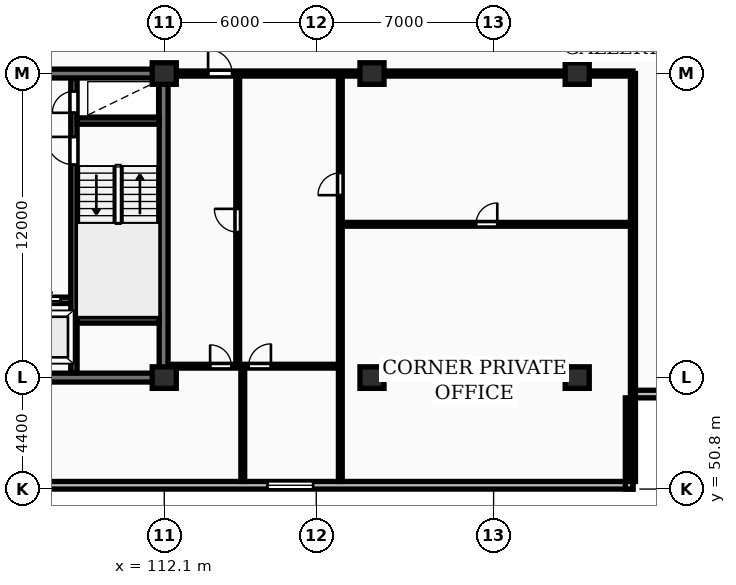
"""IFC4 building model, lengths in metres.
Left out: names, types, materials, properties, quantities, classifications, styles, units other than length and angle.
Written with IfcOpenShell. Run it as: python <this file> out.ifc"""

import sys

from ifc_helpers import new_model, si_unit, direction, frame, frame_2d, origin, origin_2d, place, context, subcontext, project, spatial, rectangle, extrude, element, fill, save


model = new_model("IFC4")
c1 = context("Model", 3, precision=1e-05, world=origin(), true_north=direction((0.0, 1.0)))
c2 = subcontext(c1, "Body", "Model", "MODEL_VIEW")
j1 = project(units=[si_unit("LENGTHUNIT", "METRE"), si_unit("PLANEANGLEUNIT", "RADIAN")], contexts=[c1])
p1 = place(None, origin())
s1 = spatial("IfcSite", under=j1, at=p1, CompositionType="ELEMENT")
p2 = place(p1, origin())
s2 = spatial("IfcBuilding", under=s1, at=p2, CompositionType="ELEMENT")
p3 = place(p2, frame((0.0, 0.0, 93.8)))
s3 = spatial("IfcBuildingStorey", under=s2, at=p3, CompositionType="ELEMENT", Elevation=93.8)
for number, where, z_axis, x_axis in (
    (1, (112.1, 55.2, 0.0), (0.0, 0.0, 1.0), (1.0, 0.0, 0.0)),
    (2, (112.1, 67.2, 0.0), (0.0, 0.0, 1.0), (1.0, 0.0, 0.0)),
    (3, (120.3, 55.2, 0.0), (0.0, 0.0, 1.0), (1.0, 0.0, 0.0)),
    (4, (120.3, 67.2, 0.0), (0.0, 0.0, 1.0), (1.0, 0.0, 0.0)),
    (5, (128.4, 55.2, 0.0), (0.0, 0.0, 1.0), (1.0, 0.0, 0.0)),
    (6, (128.4, 67.2, 0.0), (0.0, 0.0, 1.0), (1.0, 0.0, 0.0)),
):
    element("IfcColumn", number, at=place(p3, frame(where, z_axis=z_axis, x_axis=x_axis)), inside=s3, PredefinedType="COLUMN", context=c2, shape_type="SweptSolid", body=[
        extrude(rectangle(XDim=0.95, YDim=0.85, at=origin_2d()), origin(), (0.0, 0.0, 1.0), 3.25),
    ])
p4 = place(p3, frame((57.6, 50.95, 0.0), z_axis=(0.0, 0.0, 1.0), x_axis=(1.0, 0.0, 0.0)))
e7 = element("IfcWall", 7, at=p4, inside=s3, PredefinedType="STANDARD", context=c2, shape_type="SweptSolid", body=[
    extrude(rectangle(XDim=73.0, YDim=0.3, at=frame_2d((36.5, 0.0))), origin(), (0.0, 0.0, 1.0), 2.97),
])
p5 = place(p4, frame((15.225, 0.0, 0.85)))
e8 = element("IfcOpeningElement", 8, at=p5, cuts=e7, PredefinedType="OPENING", context=c2, shape_type="SweptSolid", body=[
    extrude(rectangle(XDim=1.8, YDim=1.8, at=frame_2d((0.9, 0.9))), frame((0.0, 0.16, 0.0), z_axis=(0.0, -1.0, 0.0), x_axis=(1.0, 0.0, 0.0)), (0.0, 0.0, 1.0), 0.32),
])
p6 = place(p4, frame((58.575, 0.0, 0.85)))
e9 = element("IfcOpeningElement", 9, at=p6, cuts=e7, PredefinedType="OPENING", context=c2, shape_type="SweptSolid", body=[
    extrude(rectangle(XDim=1.8, YDim=1.8, at=frame_2d((0.9, 0.9))), frame((0.0, 0.16, 0.0), z_axis=(0.0, -1.0, 0.0), x_axis=(1.0, 0.0, 0.0)), (0.0, 0.0, 1.0), 0.32),
])
for number, where, z_axis, x_axis in (
    (10, (130.45, 50.8, 0.0), (0.0, 0.0, 1.0), (0.0, 1.0, 0.0)),
    (11, (130.6, 54.55, 0.0), (0.0, 0.0, 1.0), (1.0, 0.0, 0.0)),
):
    element("IfcWall", number, at=place(p3, frame(where, z_axis=z_axis, x_axis=x_axis)), inside=s3, PredefinedType="STANDARD", context=c2, shape_type="SweptSolid", body=[
        extrude(rectangle(XDim=3.6, YDim=0.3, at=frame_2d((1.8, 0.0))), origin(), (0.0, 0.0, 1.0), 2.97),
    ])
p7 = place(p3, frame((75.95, 55.2, 0.0), z_axis=(0.0, 0.0, 1.0), x_axis=(1.0, 0.0, 0.0)))
e12 = element("IfcWall", 12, at=p7, inside=s3, PredefinedType="SHEAR", context=c2, shape_type="SweptSolid", body=[
    extrude(rectangle(XDim=36.3, YDim=0.35, at=frame_2d((18.15, 0.0))), origin(), (0.0, 0.0, 1.0), 3.25),
])
p8 = place(p3, frame((112.075, 55.375, 0.0), z_axis=(0.0, 0.0, 1.0), x_axis=(0.0, 1.0, 0.0)))
e13 = element("IfcWall", 13, at=p8, inside=s3, PredefinedType="SHEAR", context=c2, shape_type="SweptSolid", body=[
    extrude(rectangle(XDim=11.65, YDim=0.35, at=frame_2d((5.825, 0.0))), origin(), (0.0, 0.0, 1.0), 3.25),
])
p9 = place(p3, frame((75.95, 67.2, 0.0), z_axis=(0.0, 0.0, 1.0), x_axis=(1.0, 0.0, 0.0)))
e14 = element("IfcWall", 14, at=p9, inside=s3, PredefinedType="SHEAR", context=c2, shape_type="SweptSolid", body=[
    extrude(rectangle(XDim=36.3, YDim=0.35, at=frame_2d((18.15, 0.0))), origin(), (0.0, 0.0, 1.0), 3.25),
])
p10 = place(p9, frame((5.25, 0.0, 0.0)))
e15 = element("IfcOpeningElement", 15, at=p10, cuts=e14, PredefinedType="OPENING", context=c2, shape_type="SweptSolid", body=[
    extrude(rectangle(XDim=1.0, YDim=2.15, at=frame_2d((0.5, 1.075))), frame((0.0, 0.185, 0.0), z_axis=(0.0, -1.0, 0.0), x_axis=(1.0, 0.0, 0.0)), (0.0, 0.0, 1.0), 0.37),
])
p11 = place(p9, frame((21.6, 0.0, 0.0)))
e16 = element("IfcOpeningElement", 16, at=p11, cuts=e14, PredefinedType="OPENING", context=c2, shape_type="SweptSolid", body=[
    extrude(rectangle(XDim=1.5, YDim=2.2, at=frame_2d((0.75, 1.1))), frame((0.0, 0.185, 0.0), z_axis=(0.0, -1.0, 0.0), x_axis=(1.0, 0.0, 0.0)), (0.0, 0.0, 1.0), 0.37),
])
p12 = place(p9, frame((30.45, 0.0, 0.0)))
e17 = element("IfcOpeningElement", 17, at=p12, cuts=e14, PredefinedType="OPENING", context=c2, shape_type="SweptSolid", body=[
    extrude(rectangle(XDim=1.0, YDim=2.15, at=frame_2d((0.5, 1.075))), frame((0.0, 0.185, 0.0), z_axis=(0.0, -1.0, 0.0), x_axis=(1.0, 0.0, 0.0)), (0.0, 0.0, 1.0), 0.37),
])
p13 = place(p3, frame((106.22, 58.25, 0.0), z_axis=(0.0, 0.0, 1.0), x_axis=(1.0, 0.0, 0.0)))
e18 = element("IfcWall", 18, at=p13, inside=s3, PredefinedType="SHEAR", context=c2, shape_type="SweptSolid", body=[
    extrude(rectangle(XDim=2.46, YDim=0.25, at=frame_2d((1.23, 0.0))), origin(), (0.0, 0.0, 1.0), 3.25),
])
p14 = place(p13, frame((0.67, 0.0, 0.0)))
e19 = element("IfcOpeningElement", 19, at=p14, cuts=e18, PredefinedType="OPENING", context=c2, shape_type="SweptSolid", body=[
    extrude(rectangle(XDim=1.12, YDim=2.12, at=frame_2d((0.56, 1.06))), frame((0.0, 0.135, 0.0), z_axis=(0.0, -1.0, 0.0), x_axis=(1.0, 0.0, 0.0)), (0.0, 0.0, 1.0), 0.27),
])
p15 = place(p3, frame((108.535, 55.4, 0.0), z_axis=(0.0, 0.0, 1.0), x_axis=(0.0, 1.0, 0.0)))
e20 = element("IfcWall", 20, at=p15, inside=s3, PredefinedType="SHEAR", context=c2, shape_type="SweptSolid", body=[
    extrude(rectangle(XDim=11.6, YDim=0.25, at=frame_2d((5.8, 0.0))), origin(), (0.0, 0.0, 1.0), 3.25),
])
p16 = place(p15, frame((8.2, 0.0, 0.0)))
e21 = element("IfcOpeningElement", 21, at=p16, cuts=e20, PredefinedType="OPENING", context=c2, shape_type="SweptSolid", body=[
    extrude(rectangle(XDim=1.1, YDim=2.1, at=frame_2d((0.55, 1.05))), frame((0.0, 0.135, 0.0), z_axis=(0.0, -1.0, 0.0), x_axis=(1.0, 0.0, 0.0)), (0.0, 0.0, 1.0), 0.27),
])
p17 = place(p15, frame((10.25, 0.0, 0.0)))
e22 = element("IfcOpeningElement", 22, at=p17, cuts=e20, PredefinedType="OPENING", context=c2, shape_type="SweptSolid", body=[
    extrude(rectangle(XDim=0.85, YDim=2.05, at=frame_2d((0.425, 1.025))), frame((0.0, 0.135, 0.0), z_axis=(0.0, -1.0, 0.0), x_axis=(1.0, 0.0, 0.0)), (0.0, 0.0, 1.0), 0.27),
])
for number, where, z_axis, x_axis in (
    (23, (108.66, 57.475, 0.0), (0.0, 0.0, 1.0), (1.0, 0.0, 0.0)),
    (24, (108.66, 65.325, 0.0), (0.0, 0.0, 1.0), (1.0, 0.0, 0.0)),
):
    element("IfcWall", number, at=place(p3, frame(where, z_axis=z_axis, x_axis=x_axis)), inside=s3, PredefinedType="SHEAR", context=c2, shape_type="SweptSolid", body=[
        extrude(rectangle(XDim=3.24, YDim=0.25, at=frame_2d((1.62, 0.0))), origin(), (0.0, 0.0, 1.0), 3.25),
    ])
p18 = place(p3, frame((130.6, 51.1, 0.0), z_axis=(0.0, 0.0, 1.0), x_axis=(0.0, 1.0, 0.0)))
e25 = element("IfcWall", 25, at=p18, inside=s3, PredefinedType="PARTITIONING", context=c2, shape_type="SweptSolid", body=[
    extrude(rectangle(XDim=16.1, YDim=0.2, at=frame_2d((8.05, 0.0))), origin(), (0.0, 0.0, 1.0), 2.97),
])
p19 = place(p3, frame((119.05, 61.25, 0.0), z_axis=(0.0, 0.0, 1.0), x_axis=(1.0, 0.0, 0.0)))
e26 = element("IfcWall", 26, at=p19, inside=s3, PredefinedType="PARTITIONING", context=c2, shape_type="SweptSolid", body=[
    extrude(rectangle(XDim=11.55, YDim=0.15, at=frame_2d((5.775, 0.0))), origin(), (0.0, 0.0, 1.0), 2.97),
])
p20 = place(p19, frame((5.355, 0.0, 0.0)))
e27 = element("IfcOpeningElement", 27, at=p20, cuts=e26, PredefinedType="OPENING", context=c2, shape_type="SweptSolid", body=[
    extrude(rectangle(XDim=0.84, YDim=2.04, at=frame_2d((0.42, 1.02))), frame((0.0, 0.085, 0.0), z_axis=(0.0, -1.0, 0.0), x_axis=(1.0, 0.0, 0.0)), (0.0, 0.0, 1.0), 0.17),
])
p21 = place(p3, frame((119.05, 51.1, 0.0), z_axis=(0.0, 0.0, 1.0), x_axis=(0.0, 1.0, 0.0)))
e28 = element("IfcWall", 28, at=p21, inside=s3, PredefinedType="PARTITIONING", context=c2, shape_type="SweptSolid", body=[
    extrude(rectangle(XDim=16.05, YDim=0.15, at=frame_2d((8.025, 0.0))), origin(), (0.0, 0.0, 1.0), 2.97),
])
p22 = place(p21, frame((11.3, 0.0, 0.0)))
e29 = element("IfcOpeningElement", 29, at=p22, cuts=e28, PredefinedType="OPENING", context=c2, shape_type="SweptSolid", body=[
    extrude(rectangle(XDim=0.88, YDim=2.06, at=frame_2d((0.44, 1.03))), frame((0.0, 0.085, 0.0), z_axis=(0.0, -1.0, 0.0), x_axis=(1.0, 0.0, 0.0)), (0.0, 0.0, 1.0), 0.17),
])
p23 = place(p3, frame((115.0, 55.65, 0.0), z_axis=(0.0, 0.0, 1.0), x_axis=(0.0, 1.0, 0.0)))
e30 = element("IfcWall", 30, at=p23, inside=s3, PredefinedType="PARTITIONING", context=c2, shape_type="SweptSolid", body=[
    extrude(rectangle(XDim=11.5, YDim=0.15, at=frame_2d((5.75, 0.0))), origin(), (0.0, 0.0, 1.0), 2.97),
])
p24 = place(p23, frame((5.29, 0.0, 0.0)))
e31 = element("IfcOpeningElement", 31, at=p24, cuts=e30, PredefinedType="OPENING", context=c2, shape_type="SweptSolid", body=[
    extrude(rectangle(XDim=0.92, YDim=2.08, at=frame_2d((0.46, 1.04))), frame((0.0, 0.085, 0.0), z_axis=(0.0, -1.0, 0.0), x_axis=(1.0, 0.0, 0.0)), (0.0, 0.0, 1.0), 0.17),
])
p25 = place(p3, frame((115.2, 51.1, 0.0), z_axis=(0.0, 0.0, 1.0), x_axis=(0.0, 1.0, 0.0)))
e32 = element("IfcWall", 32, at=p25, inside=s3, PredefinedType="PARTITIONING", context=c2, shape_type="SweptSolid", body=[
    extrude(rectangle(XDim=4.55, YDim=0.15, at=frame_2d((2.275, 0.0))), origin(), (0.0, 0.0, 1.0), 2.97),
])
p26 = place(p3, frame((112.27, 55.65, 0.0), z_axis=(0.0, 0.0, 1.0), x_axis=(1.0, 0.0, 0.0)))
e33 = element("IfcWall", 33, at=p26, inside=s3, PredefinedType="PARTITIONING", context=c2, shape_type="SweptSolid", body=[
    extrude(rectangle(XDim=6.76, YDim=0.15, at=frame_2d((3.38, 0.0))), origin(), (0.0, 0.0, 1.0), 2.97),
])
p27 = place(p26, frame((1.64, 0.0, 0.0)))
e34 = element("IfcOpeningElement", 34, at=p27, cuts=e33, PredefinedType="OPENING", context=c2, shape_type="SweptSolid", body=[
    extrude(rectangle(XDim=0.84, YDim=2.04, at=frame_2d((0.42, 1.02))), frame((0.0, 0.085, 0.0), z_axis=(0.0, -1.0, 0.0), x_axis=(1.0, 0.0, 0.0)), (0.0, 0.0, 1.0), 0.17),
])
p28 = place(p26, frame((3.16, 0.0, 0.0)))
e35 = element("IfcOpeningElement", 35, at=p28, cuts=e33, PredefinedType="OPENING", context=c2, shape_type="SweptSolid", body=[
    extrude(rectangle(XDim=0.88, YDim=2.06, at=frame_2d((0.44, 1.03))), frame((0.0, 0.085, 0.0), z_axis=(0.0, -1.0, 0.0), x_axis=(1.0, 0.0, 0.0)), (0.0, 0.0, 1.0), 0.17),
])
p29 = place(p3, frame((112.25, 67.2, 0.0), z_axis=(0.0, 0.0, 1.0), x_axis=(1.0, 0.0, 0.0)))
e36 = element("IfcWall", 36, at=p29, inside=s3, PredefinedType="PARTITIONING", context=c2, shape_type="SweptSolid", body=[
    extrude(rectangle(XDim=18.35, YDim=0.2, at=frame_2d((9.175, 0.0))), origin(), (0.0, 0.0, 1.0), 2.433),
])
p30 = place(p29, frame((1.58, 0.0, 0.0)))
e37 = element("IfcOpeningElement", 37, at=p30, cuts=e36, PredefinedType="OPENING", context=c2, shape_type="SweptSolid", body=[
    extrude(rectangle(XDim=0.95, YDim=2.15, at=frame_2d((0.475, 1.075))), frame((0.0, 0.11, 0.0), z_axis=(0.0, -1.0, 0.0), x_axis=(1.0, 0.0, 0.0)), (0.0, 0.0, 1.0), 0.22),
])
p31 = place(p6, origin())
e38 = element("IfcWindow", 38, at=p31, inside=s3, PartitioningType="SINGLE_PANEL", PredefinedType="WINDOW", context=c2, shape_type="SweptSolid", body=[
    extrude(rectangle(XDim=1.8, YDim=1.8, at=frame_2d((0.9, 0.9))), frame((0.0, 0.03, 0.0), z_axis=(0.0, -1.0, 0.0), x_axis=(1.0, 0.0, 0.0)), (0.0, 0.0, 1.0), 0.06),
])
fill(e9, e38)
p32 = place(p14, origin())
e39 = element("IfcDoor", 39, at=p32, inside=s3, OperationType="SLIDING_TO_RIGHT", PredefinedType="DOOR", context=c2, shape_type="SweptSolid", body=[
    extrude(rectangle(XDim=1.12, YDim=2.12, at=frame_2d((0.56, 1.06))), frame((0.0, 0.025, 0.0), z_axis=(0.0, -1.0, 0.0), x_axis=(1.0, 0.0, 0.0)), (0.0, 0.0, 1.0), 0.05),
])
fill(e19, e39)
p33 = place(p16, origin())
e40 = element("IfcDoor", 40, at=p33, inside=s3, OperationType="SINGLE_SWING_RIGHT", PredefinedType="DOOR", context=c2, shape_type="SweptSolid", body=[
    extrude(rectangle(XDim=1.1, YDim=2.1, at=frame_2d((0.55, 1.05))), frame((0.0, 0.025, 0.0), z_axis=(0.0, -1.0, 0.0), x_axis=(1.0, 0.0, 0.0)), (0.0, 0.0, 1.0), 0.05),
])
fill(e21, e40)
p34 = place(p17, origin())
e41 = element("IfcDoor", 41, at=p34, inside=s3, OperationType="SINGLE_SWING_LEFT", PredefinedType="DOOR", context=c2, shape_type="SweptSolid", body=[
    extrude(rectangle(XDim=0.85, YDim=2.05, at=frame_2d((0.425, 1.025))), frame((0.0, 0.025, 0.0), z_axis=(0.0, -1.0, 0.0), x_axis=(1.0, 0.0, 0.0)), (0.0, 0.0, 1.0), 0.05),
])
fill(e22, e41)
p35 = place(p20, origin())
e42 = element("IfcDoor", 42, at=p35, inside=s3, OperationType="SINGLE_SWING_RIGHT", PredefinedType="DOOR", context=c2, shape_type="SweptSolid", body=[
    extrude(rectangle(XDim=0.84, YDim=2.04, at=frame_2d((0.42, 1.02))), frame((0.0, 0.025, 0.0), z_axis=(0.0, -1.0, 0.0), x_axis=(1.0, 0.0, 0.0)), (0.0, 0.0, 1.0), 0.05),
])
fill(e27, e42)
p36 = place(p22, origin())
e43 = element("IfcDoor", 43, at=p36, inside=s3, OperationType="SINGLE_SWING_LEFT", PredefinedType="DOOR", context=c2, shape_type="SweptSolid", body=[
    extrude(rectangle(XDim=0.88, YDim=2.06, at=frame_2d((0.44, 1.03))), frame((0.0, 0.025, 0.0), z_axis=(0.0, -1.0, 0.0), x_axis=(1.0, 0.0, 0.0)), (0.0, 0.0, 1.0), 0.05),
])
fill(e29, e43)
p37 = place(p24, origin())
e44 = element("IfcDoor", 44, at=p37, inside=s3, OperationType="SINGLE_SWING_RIGHT", PredefinedType="DOOR", context=c2, shape_type="SweptSolid", body=[
    extrude(rectangle(XDim=0.92, YDim=2.08, at=frame_2d((0.46, 1.04))), frame((0.0, 0.025, 0.0), z_axis=(0.0, -1.0, 0.0), x_axis=(1.0, 0.0, 0.0)), (0.0, 0.0, 1.0), 0.05),
])
fill(e31, e44)
p38 = place(p27, origin())
e45 = element("IfcDoor", 45, at=p38, inside=s3, OperationType="SINGLE_SWING_LEFT", PredefinedType="DOOR", context=c2, shape_type="SweptSolid", body=[
    extrude(rectangle(XDim=0.84, YDim=2.04, at=frame_2d((0.42, 1.02))), frame((0.0, 0.025, 0.0), z_axis=(0.0, -1.0, 0.0), x_axis=(1.0, 0.0, 0.0)), (0.0, 0.0, 1.0), 0.05),
])
fill(e34, e45)
p39 = place(p28, origin())
e46 = element("IfcDoor", 46, at=p39, inside=s3, OperationType="SINGLE_SWING_RIGHT", PredefinedType="DOOR", context=c2, shape_type="SweptSolid", body=[
    extrude(rectangle(XDim=0.88, YDim=2.06, at=frame_2d((0.44, 1.03))), frame((0.0, 0.025, 0.0), z_axis=(0.0, -1.0, 0.0), x_axis=(1.0, 0.0, 0.0)), (0.0, 0.0, 1.0), 0.05),
])
fill(e35, e46)
p40 = place(p30, origin())
e47 = element("IfcDoor", 47, at=p40, inside=s3, OperationType="SINGLE_SWING_LEFT", PredefinedType="DOOR", context=c2, shape_type="SweptSolid", body=[
    extrude(rectangle(XDim=0.95, YDim=2.15, at=frame_2d((0.475, 1.075))), frame((0.0, 0.025, 0.0), z_axis=(0.0, -1.0, 0.0), x_axis=(1.0, 0.0, 0.0)), (0.0, 0.0, 1.0), 0.05),
])
fill(e37, e47)
save(model, sys.argv[1])
